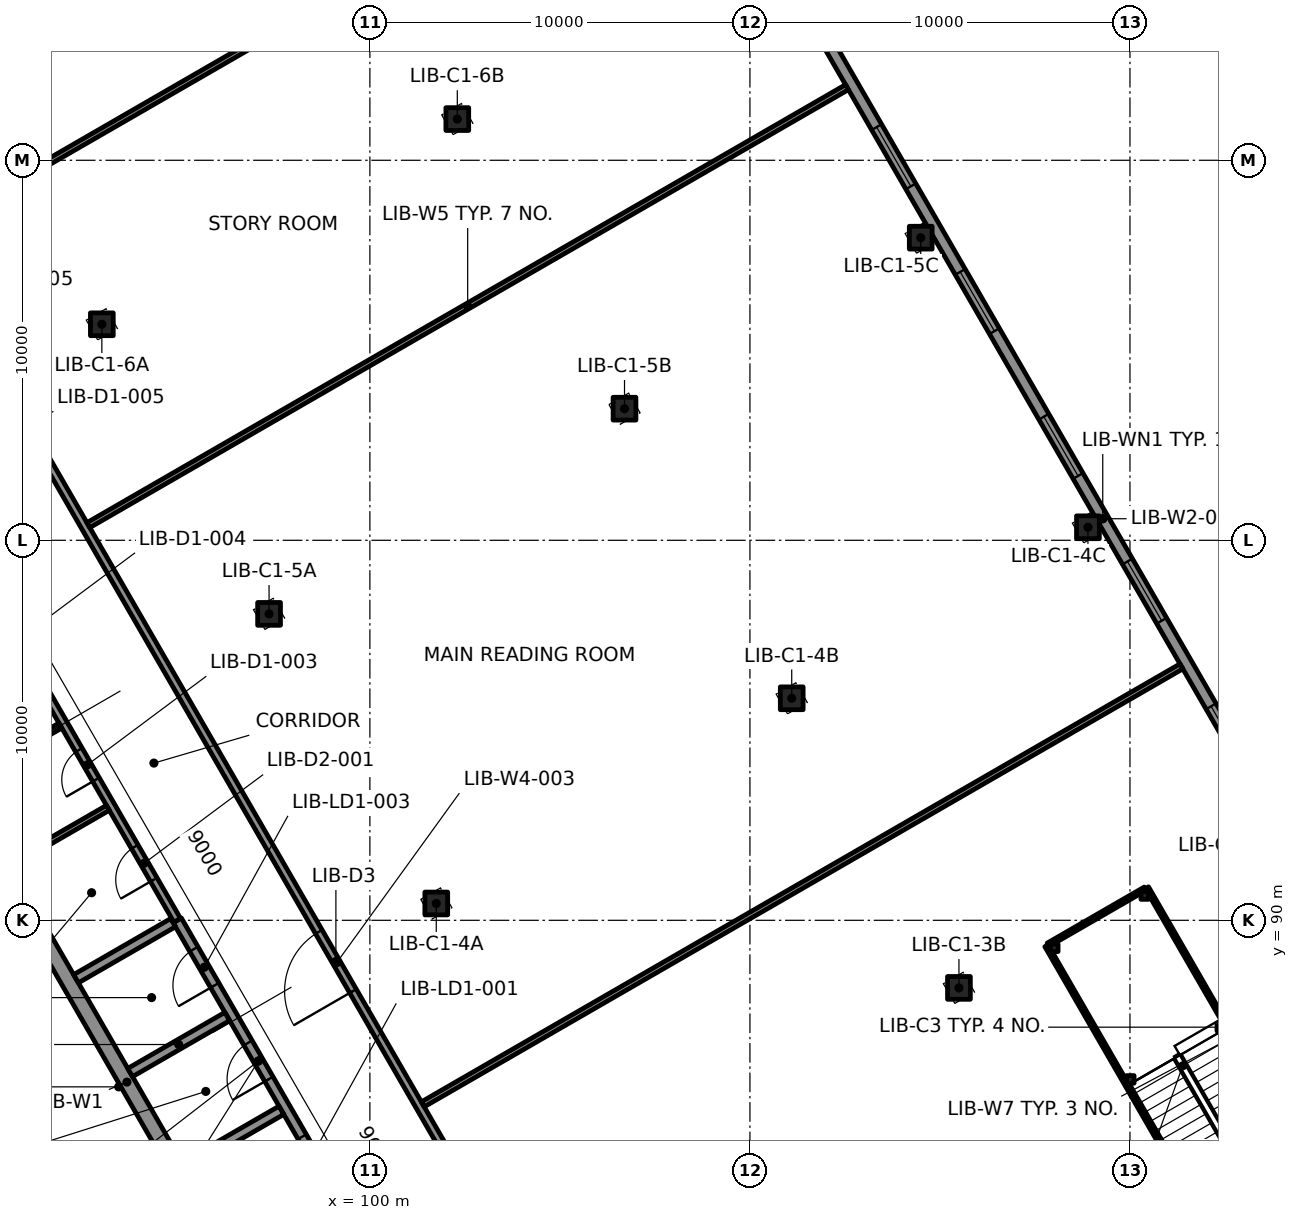
"""IFC4 building model, lengths in metres.
Left out: names, types, materials, properties, quantities, classifications, styles, units other than length and angle.
Written with IfcOpenShell. Run it as: python <this file> out.ifc"""

import sys

from ifc_helpers import new_model, si_unit, direction, frame, frame_2d, origin, origin_2d, place, context, subcontext, project, spatial, rectangle, extrude, element, fill, save


model = new_model("IFC4")
c1 = context("Model", 3, precision=1e-05, world=origin(), true_north=direction((0.0, 1.0)))
c2 = subcontext(c1, "Body", "Model", "MODEL_VIEW")
j1 = project(units=[si_unit("LENGTHUNIT", "METRE"), si_unit("PLANEANGLEUNIT", "RADIAN")], contexts=[c1])
p1 = place(None, origin())
s1 = spatial("IfcSite", under=j1, at=p1, CompositionType="ELEMENT")
p2 = place(p1, origin())
s2 = spatial("IfcBuilding", under=s1, at=p2, CompositionType="ELEMENT")
p3 = place(p2, frame((0.0, 0.0, 8.0)))
s3 = spatial("IfcBuildingStorey", under=s2, at=p3, CompositionType="ELEMENT", Elevation=8.0)
p4 = place(p3, frame((92.22, 84.942, -0.0), z_axis=(0.0, 0.0, 1.0), x_axis=(-0.5, 0.866025403784, 0.0)))
e1 = element("IfcColumn", 1, at=p4, inside=s3, PredefinedType="COLUMN", context=c2, shape_type="SweptSolid", body=[
    extrude(rectangle(XDim=1.2, YDim=1.5, at=origin_2d()), origin(), (0.0, 0.0, 1.0), 4.601),
])
for number, where, z_axis, x_axis in (
    (2, (115.5, 88.221, -0.36), (0.0, 0.0, 1.0), (1.0, 0.0, 0.0)),
    (3, (101.747, 90.442, -0.36), (0.0, 0.0, 1.0), (1.0, 0.0, 0.0)),
    (4, (111.1, 95.842, -0.36), (0.0, 0.0, 1.0), (1.0, 0.0, 0.0)),
    (5, (118.894, 100.342, -0.36), (0.0, 0.0, 1.0), (1.0, 0.0, 0.0)),
    (6, (97.347, 98.063, -0.36), (0.0, 0.0, 1.0), (1.0, 0.0, 0.0)),
    (7, (106.7, 103.463, -0.36), (0.0, 0.0, 1.0), (1.0, 0.0, 0.0)),
    (8, (114.494, 107.963, -0.36), (0.0, 0.0, 1.0), (1.0, 0.0, 0.0)),
    (9, (92.947, 105.684, -0.36), (0.0, 0.0, 1.0), (1.0, 0.0, 0.0)),
    (10, (102.3, 111.084, -0.36), (0.0, 0.0, 1.0), (1.0, 0.0, 0.0)),
):
    element("IfcColumn", number, at=place(p3, frame(where, z_axis=z_axis, x_axis=x_axis)), inside=s3, PredefinedType="COLUMN", context=c2, shape_type="SweptSolid", body=[
        extrude(rectangle(XDim=0.6, YDim=0.6, at=origin_2d()), origin(), (0.0, 0.0, 1.0), 4.6),
    ])
for number, where, z_axis, x_axis in (
    (11, (122.39, 87.188, -4.0), (0.0, 0.0, 1.0), (1.0, 0.0, 0.0)),
    (12, (120.008, 85.813, -4.0), (0.0, 0.0, 1.0), (1.0, 0.0, 0.0)),
    (13, (120.39, 90.652, -4.0), (0.0, 0.0, 1.0), (1.0, 0.0, 0.0)),
    (14, (118.008, 89.277, -4.0), (0.0, 0.0, 1.0), (1.0, 0.0, 0.0)),
):
    element("IfcColumn", number, at=place(p3, frame(where, z_axis=z_axis, x_axis=x_axis)), inside=s3, PredefinedType="COLUMN", context=c2, shape_type="SweptSolid", body=[
        extrude(rectangle(XDim=0.2, YDim=0.2, at=origin_2d()), origin(), (0.0, 0.0, 1.0), 6.1),
    ])
p5 = place(p3, frame((107.106, 62.36, 0.0), z_axis=(0.0, 0.0, 1.0), x_axis=(-0.49999992739, 0.866025445706, 0.0)))
e15 = element("IfcWall", 15, at=p5, inside=s3, PredefinedType="SOLIDWALL", context=c2, shape_type="SweptSolid", body=[
    extrude(rectangle(XDim=54.0, YDim=0.4, at=frame_2d((27.0, 0.0))), origin(), (0.0, 0.0, 1.0), 4.24),
])
p6 = place(p3, frame((132.784, 77.185, 0.0), z_axis=(0.0, 0.0, 1.0), x_axis=(-0.49999992739, 0.866025445706, 0.0)))
e16 = element("IfcWall", 16, at=p6, inside=s3, PredefinedType="SOLIDWALL", context=c2, shape_type="SweptSolid", body=[
    extrude(rectangle(XDim=54.0, YDim=0.3, at=frame_2d((27.0, 0.0))), origin(), (0.0, 0.0, 1.0), 4.24),
])
p7 = place(p6, frame((1.9, 0.0, 0.9)))
e17 = element("IfcOpeningElement", 17, at=p7, cuts=e16, PredefinedType="OPENING", context=c2, shape_type="SweptSolid", body=[
    extrude(rectangle(XDim=1.8, YDim=2.4, at=frame_2d((0.9, 1.2))), frame((0.0, 0.16, 0.0), z_axis=(0.0, -1.0, 0.0), x_axis=(1.0, 0.0, 0.0)), (0.0, 0.0, 1.0), 0.32),
])
p8 = place(p6, frame((6.3, 0.0, 0.9)))
e18 = element("IfcOpeningElement", 18, at=p8, cuts=e16, PredefinedType="OPENING", context=c2, shape_type="SweptSolid", body=[
    extrude(rectangle(XDim=1.8, YDim=2.4, at=frame_2d((0.9, 1.2))), frame((0.0, 0.16, 0.0), z_axis=(0.0, -1.0, 0.0), x_axis=(1.0, 0.0, 0.0)), (0.0, 0.0, 1.0), 0.32),
])
p9 = place(p6, frame((10.7, 0.0, 0.9)))
e19 = element("IfcOpeningElement", 19, at=p9, cuts=e16, PredefinedType="OPENING", context=c2, shape_type="SweptSolid", body=[
    extrude(rectangle(XDim=1.8, YDim=2.4, at=frame_2d((0.9, 1.2))), frame((0.0, 0.16, 0.0), z_axis=(0.0, -1.0, 0.0), x_axis=(1.0, 0.0, 0.0)), (0.0, 0.0, 1.0), 0.32),
])
p10 = place(p6, frame((15.1, 0.0, 0.9)))
e20 = element("IfcOpeningElement", 20, at=p10, cuts=e16, PredefinedType="OPENING", context=c2, shape_type="SweptSolid", body=[
    extrude(rectangle(XDim=1.8, YDim=2.4, at=frame_2d((0.9, 1.2))), frame((0.0, 0.16, 0.0), z_axis=(0.0, -1.0, 0.0), x_axis=(1.0, 0.0, 0.0)), (0.0, 0.0, 1.0), 0.32),
])
p11 = place(p6, frame((19.5, 0.0, 0.9)))
e21 = element("IfcOpeningElement", 21, at=p11, cuts=e16, PredefinedType="OPENING", context=c2, shape_type="SweptSolid", body=[
    extrude(rectangle(XDim=1.8, YDim=2.4, at=frame_2d((0.9, 1.2))), frame((0.0, 0.16, 0.0), z_axis=(0.0, -1.0, 0.0), x_axis=(1.0, 0.0, 0.0)), (0.0, 0.0, 1.0), 0.32),
])
p12 = place(p6, frame((23.9, 0.0, 0.9)))
e22 = element("IfcOpeningElement", 22, at=p12, cuts=e16, PredefinedType="OPENING", context=c2, shape_type="SweptSolid", body=[
    extrude(rectangle(XDim=1.8, YDim=2.4, at=frame_2d((0.9, 1.2))), frame((0.0, 0.16, 0.0), z_axis=(0.0, -1.0, 0.0), x_axis=(1.0, 0.0, 0.0)), (0.0, 0.0, 1.0), 0.32),
])
p13 = place(p6, frame((28.3, 0.0, 0.9)))
e23 = element("IfcOpeningElement", 23, at=p13, cuts=e16, PredefinedType="OPENING", context=c2, shape_type="SweptSolid", body=[
    extrude(rectangle(XDim=1.8, YDim=2.4, at=frame_2d((0.9, 1.2))), frame((0.0, 0.16, 0.0), z_axis=(0.0, -1.0, 0.0), x_axis=(1.0, 0.0, 0.0)), (0.0, 0.0, 1.0), 0.32),
])
p14 = place(p6, frame((32.7, 0.0, 0.9)))
e24 = element("IfcOpeningElement", 24, at=p14, cuts=e16, PredefinedType="OPENING", context=c2, shape_type="SweptSolid", body=[
    extrude(rectangle(XDim=1.8, YDim=2.4, at=frame_2d((0.9, 1.2))), frame((0.0, 0.16, 0.0), z_axis=(0.0, -1.0, 0.0), x_axis=(1.0, 0.0, 0.0)), (0.0, 0.0, 1.0), 0.32),
])
p15 = place(p6, frame((37.1, 0.0, 0.9)))
e25 = element("IfcOpeningElement", 25, at=p15, cuts=e16, PredefinedType="OPENING", context=c2, shape_type="SweptSolid", body=[
    extrude(rectangle(XDim=1.8, YDim=2.4, at=frame_2d((0.9, 1.2))), frame((0.0, 0.16, 0.0), z_axis=(0.0, -1.0, 0.0), x_axis=(1.0, 0.0, 0.0)), (0.0, 0.0, 1.0), 0.32),
])
p16 = place(p6, frame((41.5, 0.0, 0.9)))
e26 = element("IfcOpeningElement", 26, at=p16, cuts=e16, PredefinedType="OPENING", context=c2, shape_type="SweptSolid", body=[
    extrude(rectangle(XDim=1.8, YDim=2.4, at=frame_2d((0.9, 1.2))), frame((0.0, 0.16, 0.0), z_axis=(0.0, -1.0, 0.0), x_axis=(1.0, 0.0, 0.0)), (0.0, 0.0, 1.0), 0.32),
])
p17 = place(p6, frame((45.9, 0.0, 0.9)))
e27 = element("IfcOpeningElement", 27, at=p17, cuts=e16, PredefinedType="OPENING", context=c2, shape_type="SweptSolid", body=[
    extrude(rectangle(XDim=1.8, YDim=2.4, at=frame_2d((0.9, 1.2))), frame((0.0, 0.16, 0.0), z_axis=(0.0, -1.0, 0.0), x_axis=(1.0, 0.0, 0.0)), (0.0, 0.0, 1.0), 0.32),
])
p18 = place(p6, frame((50.3, 0.0, 0.9)))
e28 = element("IfcOpeningElement", 28, at=p18, cuts=e16, PredefinedType="OPENING", context=c2, shape_type="SweptSolid", body=[
    extrude(rectangle(XDim=1.8, YDim=2.4, at=frame_2d((0.9, 1.2))), frame((0.0, 0.16, 0.0), z_axis=(0.0, -1.0, 0.0), x_axis=(1.0, 0.0, 0.0)), (0.0, 0.0, 1.0), 0.32),
])
p19 = place(p3, frame((80.354, 109.095, 0.0), z_axis=(0.0, 0.0, 1.0), x_axis=(0.866026568746, 0.499997982221, 0.0)))
e29 = element("IfcWall", 29, at=p19, inside=s3, PredefinedType="SOLIDWALL", context=c2, shape_type="SweptSolid", body=[
    extrude(rectangle(XDim=29.3, YDim=0.3, at=frame_2d((14.65, 0.0))), origin(), (0.0, 0.0, 1.0), 4.24),
])
p20 = place(p3, frame((99.205, 82.595, 0.0), z_axis=(0.0, 0.0, 1.0), x_axis=(-0.500011643316, 0.866018681408, 0.0)))
e30 = element("IfcWall", 30, at=p20, inside=s3, PredefinedType="SOLIDWALL", context=c2, shape_type="SweptSolid", body=[
    extrude(rectangle(XDim=8.55, YDim=0.25, at=frame_2d((4.275, 0.0))), origin(), (0.0, 0.0, 1.0), 4.24),
])
p21 = place(p20, frame((0.875, 0.0, 0.0)))
e31 = element("IfcOpeningElement", 31, at=p21, cuts=e30, PredefinedType="OPENING", context=c2, shape_type="SweptSolid", body=[
    extrude(rectangle(XDim=1.1, YDim=2.1, at=frame_2d((0.55, 1.05))), frame((0.0, 0.135, 0.0), z_axis=(0.0, -1.0, 0.0), x_axis=(1.0, 0.0, 0.0)), (0.0, 0.0, 1.0), 0.27),
])
p22 = place(p20, frame((3.725, 0.0, 0.0)))
e32 = element("IfcOpeningElement", 32, at=p22, cuts=e30, PredefinedType="OPENING", context=c2, shape_type="SweptSolid", body=[
    extrude(rectangle(XDim=1.1, YDim=2.1, at=frame_2d((0.55, 1.05))), frame((0.0, 0.135, 0.0), z_axis=(0.0, -1.0, 0.0), x_axis=(1.0, 0.0, 0.0)), (0.0, 0.0, 1.0), 0.27),
])
p23 = place(p20, frame((6.575, 0.0, 0.0)))
e33 = element("IfcOpeningElement", 33, at=p23, cuts=e30, PredefinedType="OPENING", context=c2, shape_type="SweptSolid", body=[
    extrude(rectangle(XDim=1.1, YDim=2.1, at=frame_2d((0.55, 1.05))), frame((0.0, 0.135, 0.0), z_axis=(0.0, -1.0, 0.0), x_axis=(1.0, 0.0, 0.0)), (0.0, 0.0, 1.0), 0.27),
])
p24 = place(p3, frame((94.93, 90.0, 0.0), z_axis=(0.0, 0.0, 1.0), x_axis=(-0.499997667785, 0.866026750285, 0.0)))
e34 = element("IfcWall", 34, at=p24, inside=s3, PredefinedType="PARTITIONING", context=c2, shape_type="SweptSolid", body=[
    extrude(rectangle(XDim=14.59, YDim=0.2, at=frame_2d((7.295, 0.0))), origin(), (0.0, 0.0, 1.0), 4.24),
])
p25 = place(p24, frame((1.235, 0.0, 0.0)))
e35 = element("IfcOpeningElement", 35, at=p25, cuts=e34, PredefinedType="OPENING", context=c2, shape_type="SweptSolid", body=[
    extrude(rectangle(XDim=1.0, YDim=2.1, at=frame_2d((0.5, 1.05))), frame((0.0, 0.11, 0.0), z_axis=(0.0, -1.0, 0.0), x_axis=(1.0, 0.0, 0.0)), (0.0, 0.0, 1.0), 0.22),
])
p26 = place(p24, frame((4.275, 0.0, 0.0)))
e36 = element("IfcOpeningElement", 36, at=p26, cuts=e34, PredefinedType="OPENING", context=c2, shape_type="SweptSolid", body=[
    extrude(rectangle(XDim=0.9, YDim=2.1, at=frame_2d((0.45, 1.05))), frame((0.0, 0.11, 0.0), z_axis=(0.0, -1.0, 0.0), x_axis=(1.0, 0.0, 0.0)), (0.0, 0.0, 1.0), 0.22),
])
p27 = place(p24, frame((8.025, 0.0, 0.0)))
e37 = element("IfcOpeningElement", 37, at=p27, cuts=e34, PredefinedType="OPENING", context=c2, shape_type="SweptSolid", body=[
    extrude(rectangle(XDim=0.9, YDim=2.1, at=frame_2d((0.45, 1.05))), frame((0.0, 0.11, 0.0), z_axis=(0.0, -1.0, 0.0), x_axis=(1.0, 0.0, 0.0)), (0.0, 0.0, 1.0), 0.22),
])
p28 = place(p24, frame((12.325, 0.0, 0.0)))
e38 = element("IfcOpeningElement", 38, at=p28, cuts=e34, PredefinedType="OPENING", context=c2, shape_type="SweptSolid", body=[
    extrude(rectangle(XDim=0.9, YDim=2.1, at=frame_2d((0.45, 1.05))), frame((0.0, 0.11, 0.0), z_axis=(0.0, -1.0, 0.0), x_axis=(1.0, 0.0, 0.0)), (0.0, 0.0, 1.0), 0.22),
])
for number, where, z_axis, x_axis in (
    (39, (95.117, 83.526, 0.0), (0.0, 0.0, 1.0), (0.866, 0.5, 0.0)),
    (40, (93.692, 85.994, 0.0), (0.0, 0.0, 1.0), (0.866, 0.5, 0.0)),
):
    element("IfcWall", number, at=place(p3, frame(where, z_axis=z_axis, x_axis=x_axis)), inside=s3, PredefinedType="SOLIDWALL", context=c2, shape_type="SweptSolid", body=[
        extrude(rectangle(XDim=2.95, YDim=0.25, at=frame_2d((1.475, 0.0))), origin(), (0.0, 0.0, 1.0), 4.24),
    ])
p29 = place(p3, frame((92.267, 88.462, 0.0), z_axis=(0.0, 0.0, 1.0), x_axis=(0.866024349092, 0.500001826776, 0.0)))
e41 = element("IfcWall", 41, at=p29, inside=s3, PredefinedType="SOLIDWALL", context=c2, shape_type="SweptSolid", body=[
    extrude(rectangle(XDim=2.95, YDim=0.25, at=frame_2d((1.475, 0.0))), origin(), (0.0, 0.0, 1.0), 4.24),
])
for number, where, z_axis, x_axis in (
    (42, (90.529, 91.471, 0.0), (0.0, 0.0, 1.0), (0.866, 0.5, 0.0)),
    (43, (89.279, 93.636, 0.0), (0.0, 0.0, 1.0), (0.866, 0.5, 0.0)),
):
    element("IfcWall", number, at=place(p3, frame(where, z_axis=z_axis, x_axis=x_axis)), inside=s3, PredefinedType="PARTITIONING", context=c2, shape_type="SweptSolid", body=[
        extrude(rectangle(XDim=2.975, YDim=0.15, at=frame_2d((1.488, 0.0))), origin(), (0.0, 0.0, 1.0), 4.24),
    ])
p30 = place(p3, frame((112.496, 65.725, 0.0), z_axis=(0.0, 0.0, 1.0), x_axis=(-0.499998673217, 0.866026169802, 0.0)))
e44 = element("IfcWall", 44, at=p30, inside=s3, PredefinedType="PARTITIONING", context=c2, shape_type="SweptSolid", body=[
    extrude(rectangle(XDim=53.48, YDim=0.2, at=frame_2d((26.74, 0.0))), origin(), (0.0, 0.0, 1.0), 4.24),
])
p31 = place(p30, frame((13.08, 0.0, 0.0)))
e45 = element("IfcOpeningElement", 45, at=p31, cuts=e44, PredefinedType="OPENING", context=c2, shape_type="SweptSolid", body=[
    extrude(rectangle(XDim=1.0, YDim=2.1, at=frame_2d((0.5, 1.05))), frame((0.0, 0.11, 0.0), z_axis=(0.0, -1.0, 0.0), x_axis=(1.0, 0.0, 0.0)), (0.0, 0.0, 1.0), 0.22),
])
p32 = place(p30, frame((25.88, 0.0, 0.0)))
e46 = element("IfcOpeningElement", 46, at=p32, cuts=e44, PredefinedType="OPENING", context=c2, shape_type="SweptSolid", body=[
    extrude(rectangle(XDim=1.8, YDim=2.1, at=frame_2d((0.9, 1.05))), frame((0.0, 0.11, 0.0), z_axis=(0.0, -1.0, 0.0), x_axis=(1.0, 0.0, 0.0)), (0.0, 0.0, 1.0), 0.22),
])
p33 = place(p30, frame((50.58, 0.0, 0.0)))
e47 = element("IfcOpeningElement", 47, at=p33, cuts=e44, PredefinedType="OPENING", context=c2, shape_type="SweptSolid", body=[
    extrude(rectangle(XDim=1.0, YDim=2.1, at=frame_2d((0.5, 1.05))), frame((0.0, 0.11, 0.0), z_axis=(0.0, -1.0, 0.0), x_axis=(1.0, 0.0, 0.0)), (0.0, 0.0, 1.0), 0.22),
])
p34 = place(p30, frame((44.28, 0.0, 0.0)))
e48 = element("IfcOpeningElement", 48, at=p34, cuts=e44, PredefinedType="OPENING", context=c2, shape_type="SweptSolid", body=[
    extrude(rectangle(XDim=1.0, YDim=2.1, at=frame_2d((0.5, 1.05))), frame((0.0, 0.11, 0.0), z_axis=(0.0, -1.0, 0.0), x_axis=(1.0, 0.0, 0.0)), (0.0, 0.0, 1.0), 0.22),
])
p35 = place(p3, frame((101.392, 85.157, 0.0), z_axis=(0.0, 0.0, 1.0), x_axis=(0.866022961126, 0.500004230785, 0.0)))
e49 = element("IfcWall", 49, at=p35, inside=s3, PredefinedType="PARTITIONING", context=c2, shape_type="SweptSolid", body=[
    extrude(rectangle(XDim=23.05, YDim=0.15, at=frame_2d((11.525, 0.0))), origin(), (0.0, 0.0, 1.0), 4.24),
])
for number, where, z_axis, x_axis in (
    (50, (122.333, 81.486, 0.0), (0.0, 0.0, 1.0), (-0.5, 0.866, 0.0)),
    (51, (124.975, 83.01, 0.0), (0.0, 0.0, 1.0), (-0.5, 0.866, 0.0)),
):
    element("IfcWall", number, at=place(p3, frame(where, z_axis=z_axis, x_axis=x_axis)), inside=s3, PredefinedType="PARTITIONING", context=c2, shape_type="SweptSolid", body=[
        extrude(rectangle(XDim=9.06, YDim=0.1, at=frame_2d((4.53, 0.0))), origin(), (0.0, 0.0, 1.0), 4.24),
    ])
p36 = place(p3, frame((117.847, 89.357, 0.0), z_axis=(0.0, 0.0, 1.0), x_axis=(0.866003658127, 0.500037662692, 0.0)))
e52 = element("IfcWall", 52, at=p36, inside=s3, PredefinedType="PARTITIONING", context=c2, shape_type="SweptSolid", body=[
    extrude(rectangle(XDim=2.95, YDim=0.1, at=frame_2d((1.475, 0.0))), origin(), (0.0, 0.0, 1.0), 4.24),
])
for number, where, z_axis, x_axis in (
    (53, (92.592, 100.399, 0.0), (0.0, 0.0, 1.0), (0.866, 0.5, 0.0)),
    (54, (88.192, 108.02, 0.0), (0.0, 0.0, 1.0), (0.866, 0.5, 0.0)),
):
    element("IfcWall", number, at=place(p3, frame(where, z_axis=z_axis, x_axis=x_axis)), inside=s3, PredefinedType="PARTITIONING", context=c2, shape_type="SweptSolid", body=[
        extrude(rectangle(XDim=23.05, YDim=0.15, at=frame_2d((11.525, 0.0))), origin(), (0.0, 0.0, 1.0), 4.24),
    ])
p37 = place(p11, origin())
e55 = element("IfcWindow", 55, at=p37, inside=s3, PartitioningType="SINGLE_PANEL", PredefinedType="WINDOW", context=c2, shape_type="SweptSolid", body=[
    extrude(rectangle(XDim=1.8, YDim=2.4, at=frame_2d((0.9, 1.2))), frame((0.0, 0.03, 0.0), z_axis=(0.0, -1.0, 0.0), x_axis=(1.0, 0.0, 0.0)), (0.0, 0.0, 1.0), 0.06),
])
fill(e21, e55)
p38 = place(p12, origin())
e56 = element("IfcWindow", 56, at=p38, inside=s3, PartitioningType="SINGLE_PANEL", PredefinedType="WINDOW", context=c2, shape_type="SweptSolid", body=[
    extrude(rectangle(XDim=1.8, YDim=2.4, at=frame_2d((0.9, 1.2))), frame((0.0, 0.03, 0.0), z_axis=(0.0, -1.0, 0.0), x_axis=(1.0, 0.0, 0.0)), (0.0, 0.0, 1.0), 0.06),
])
fill(e22, e56)
p39 = place(p13, origin())
e57 = element("IfcWindow", 57, at=p39, inside=s3, PartitioningType="SINGLE_PANEL", PredefinedType="WINDOW", context=c2, shape_type="SweptSolid", body=[
    extrude(rectangle(XDim=1.8, YDim=2.4, at=frame_2d((0.9, 1.2))), frame((0.0, 0.03, 0.0), z_axis=(0.0, -1.0, 0.0), x_axis=(1.0, 0.0, 0.0)), (0.0, 0.0, 1.0), 0.06),
])
fill(e23, e57)
p40 = place(p14, origin())
e58 = element("IfcWindow", 58, at=p40, inside=s3, PartitioningType="SINGLE_PANEL", PredefinedType="WINDOW", context=c2, shape_type="SweptSolid", body=[
    extrude(rectangle(XDim=1.8, YDim=2.4, at=frame_2d((0.9, 1.2))), frame((0.0, 0.03, 0.0), z_axis=(0.0, -1.0, 0.0), x_axis=(1.0, 0.0, 0.0)), (0.0, 0.0, 1.0), 0.06),
])
fill(e24, e58)
p41 = place(p15, origin())
e59 = element("IfcWindow", 59, at=p41, inside=s3, PartitioningType="SINGLE_PANEL", PredefinedType="WINDOW", context=c2, shape_type="SweptSolid", body=[
    extrude(rectangle(XDim=1.8, YDim=2.4, at=frame_2d((0.9, 1.2))), frame((0.0, 0.03, 0.0), z_axis=(0.0, -1.0, 0.0), x_axis=(1.0, 0.0, 0.0)), (0.0, 0.0, 1.0), 0.06),
])
fill(e25, e59)
p42 = place(p25, origin())
e60 = element("IfcDoor", 60, at=p42, inside=s3, OperationType="SINGLE_SWING_LEFT", PredefinedType="DOOR", context=c2, shape_type="SweptSolid", body=[
    extrude(rectangle(XDim=1.0, YDim=2.1, at=frame_2d((0.5, 1.05))), frame((0.0, 0.025, 0.0), z_axis=(0.0, -1.0, 0.0), x_axis=(1.0, 0.0, 0.0)), (0.0, 0.0, 1.0), 0.05),
])
fill(e35, e60)
p43 = place(p26, origin())
e61 = element("IfcDoor", 61, at=p43, inside=s3, OperationType="SINGLE_SWING_RIGHT", PredefinedType="DOOR", context=c2, shape_type="SweptSolid", body=[
    extrude(rectangle(XDim=0.9, YDim=2.1, at=frame_2d((0.45, 1.05))), frame((0.0, 0.025, 0.0), z_axis=(0.0, -1.0, 0.0), x_axis=(1.0, 0.0, 0.0)), (0.0, 0.0, 1.0), 0.05),
])
fill(e36, e61)
p44 = place(p21, origin())
e62 = element("IfcDoor", 62, at=p44, inside=s3, OperationType="DOUBLE_DOOR_SLIDING", PredefinedType="DOOR", context=c2, shape_type="SweptSolid", body=[
    extrude(rectangle(XDim=1.1, YDim=2.1, at=frame_2d((0.55, 1.05))), frame((0.0, 0.025, 0.0), z_axis=(0.0, -1.0, 0.0), x_axis=(1.0, 0.0, 0.0)), (0.0, 0.0, 1.0), 0.05),
])
fill(e31, e62)
p45 = place(p22, origin())
e63 = element("IfcDoor", 63, at=p45, inside=s3, OperationType="DOUBLE_DOOR_SLIDING", PredefinedType="DOOR", context=c2, shape_type="SweptSolid", body=[
    extrude(rectangle(XDim=1.1, YDim=2.1, at=frame_2d((0.55, 1.05))), frame((0.0, 0.025, 0.0), z_axis=(0.0, -1.0, 0.0), x_axis=(1.0, 0.0, 0.0)), (0.0, 0.0, 1.0), 0.05),
])
fill(e32, e63)
p46 = place(p23, origin())
e64 = element("IfcDoor", 64, at=p46, inside=s3, OperationType="DOUBLE_DOOR_SLIDING", PredefinedType="DOOR", context=c2, shape_type="SweptSolid", body=[
    extrude(rectangle(XDim=1.1, YDim=2.1, at=frame_2d((0.55, 1.05))), frame((0.0, 0.025, 0.0), z_axis=(0.0, -1.0, 0.0), x_axis=(1.0, 0.0, 0.0)), (0.0, 0.0, 1.0), 0.05),
])
fill(e33, e64)
p47 = place(p32, origin())
e65 = element("IfcDoor", 65, at=p47, inside=s3, OperationType="DOUBLE_DOOR_SINGLE_SWING", PredefinedType="DOOR", context=c2, shape_type="SweptSolid", body=[
    extrude(rectangle(XDim=1.8, YDim=2.1, at=frame_2d((0.9, 1.05))), frame((0.0, 0.025, 0.0), z_axis=(0.0, -1.0, 0.0), x_axis=(1.0, 0.0, 0.0)), (0.0, 0.0, 1.0), 0.05),
])
fill(e46, e65)
save(model, sys.argv[1])
